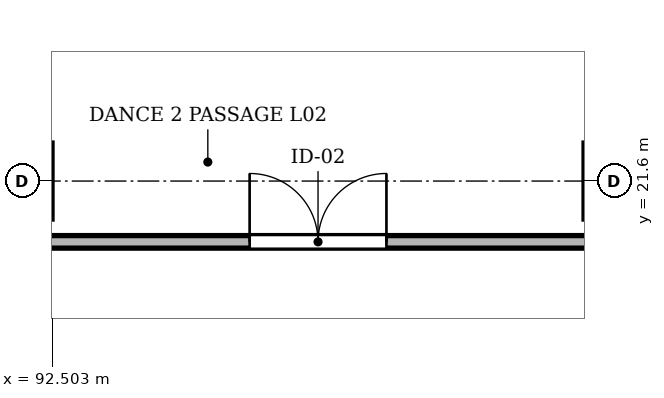
"""IFC4 building model, lengths in metres.
Left out: names, types, materials, properties, quantities, classifications, styles, units other than length and angle.
Written with IfcOpenShell. Run it as: python <this file> out.ifc"""

import sys

from ifc_helpers import new_model, si_unit, direction, frame, frame_2d, origin, place, context, subcontext, project, spatial, rectangle, extrude, element, fill, save


model = new_model("IFC4")
c1 = context("Model", 3, precision=1e-05, world=origin(), true_north=direction((0.0, 1.0)))
c2 = subcontext(c1, "Body", "Model", "MODEL_VIEW")
j1 = project(units=[si_unit("LENGTHUNIT", "METRE"), si_unit("PLANEANGLEUNIT", "RADIAN")], contexts=[c1])
p1 = place(None, origin())
s1 = spatial("IfcSite", under=j1, at=p1, CompositionType="ELEMENT")
p2 = place(p1, origin())
s2 = spatial("IfcBuilding", under=s1, at=p2, CompositionType="ELEMENT")
p3 = place(p2, frame((0.0, 0.0, 9.4)))
s3 = spatial("IfcBuildingStorey", under=s2, at=p3, CompositionType="ELEMENT", Elevation=9.4)
p4 = place(p3, frame((76.8, 20.8, 0.0), z_axis=(0.0, 0.0, 1.0), x_axis=(1.0, 0.0, 0.0)))
e1 = element("IfcWall", 1, at=p4, inside=s3, PredefinedType="PARTITIONING", context=c2, shape_type="SweptSolid", body=[
    extrude(rectangle(XDim=37.9, YDim=0.165, at=frame_2d((18.95, 0.0))), origin(), (0.0, 0.0, 1.0), 3.88),
])
p5 = place(p4, frame((18.3, 0.0, 0.0)))
e2 = element("IfcOpeningElement", 2, at=p5, cuts=e1, PredefinedType="OPENING", context=c2, shape_type="SweptSolid", body=[
    extrude(rectangle(XDim=1.8, YDim=2.25, at=frame_2d((0.9, 1.125))), frame((0.0, 0.094, 0.0), z_axis=(0.0, -1.0, 0.0), x_axis=(1.0, 0.0, 0.0)), (0.0, 0.0, 1.0), 0.189),
])
p6 = place(p5, origin())
e3 = element("IfcDoor", 3, at=p6, inside=s3, OperationType="DOUBLE_DOOR_SINGLE_SWING", PredefinedType="DOOR", context=c2, shape_type="SweptSolid", body=[
    extrude(rectangle(XDim=1.8, YDim=2.25, at=frame_2d((0.9, 1.125))), frame((0.0, 0.025, 0.0), z_axis=(0.0, -1.0, 0.0), x_axis=(1.0, 0.0, 0.0)), (0.0, 0.0, 1.0), 0.05),
])
fill(e2, e3)
save(model, sys.argv[1])
